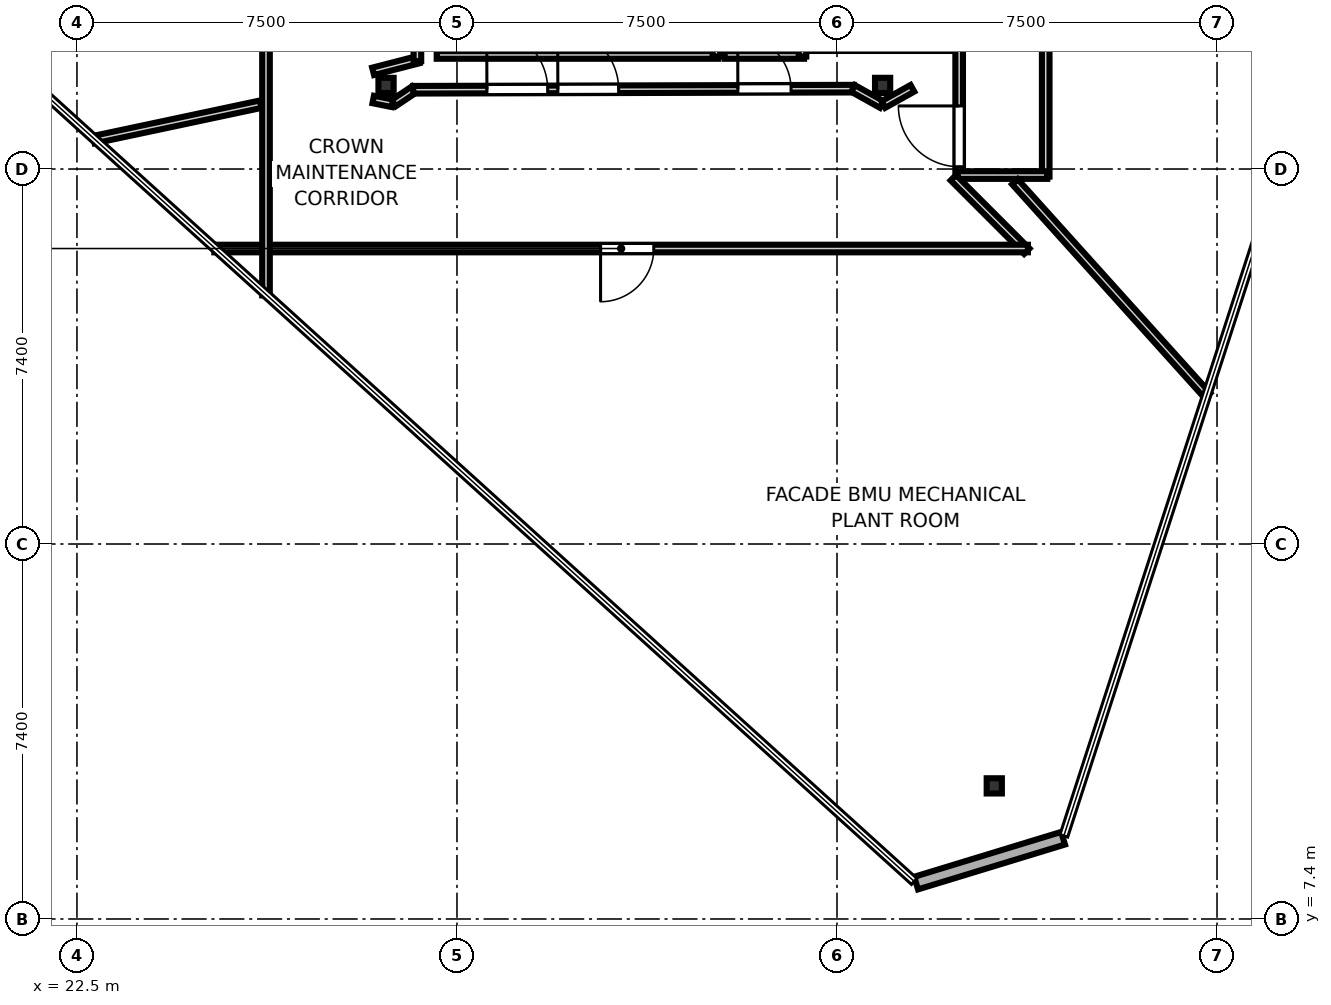
"""IFC4 building model, lengths in metres.
Left out: names, types, materials, properties, quantities, classifications, styles, units other than length and angle.
Written with IfcOpenShell. Run it as: python <this file> out.ifc"""

import sys

from ifc_helpers import new_model, si_unit, direction, frame, frame_2d, origin, origin_2d, place, context, subcontext, project, spatial, rectangle, i_section, extrude, element, fill, save


model = new_model("IFC4")
c1 = context("Model", 3, precision=1e-05, world=origin(), true_north=direction((0.0, 1.0)))
c2 = subcontext(c1, "Body", "Model", "MODEL_VIEW")
j1 = project(units=[si_unit("LENGTHUNIT", "METRE"), si_unit("PLANEANGLEUNIT", "RADIAN")], contexts=[c1])
p1 = place(None, origin())
s1 = spatial("IfcSite", under=j1, at=p1, CompositionType="ELEMENT")
p2 = place(p1, origin())
s2 = spatial("IfcBuilding", under=s1, at=p2, CompositionType="ELEMENT")
p3 = place(p2, frame((0.0, 0.0, 367.55)))
s3 = spatial("IfcBuildingStorey", under=s2, at=p3, CompositionType="ELEMENT", Elevation=367.55)
for number, where, z_axis, x_axis in (
    (1, (28.6, 23.85, 0.0), (0.0, 0.0, 1.0), (1.0, 0.0, 0.0)),
    (2, (38.4, 23.85, 0.0), (0.0, 0.0, 1.0), (1.0, 0.0, 0.0)),
    (3, (40.604, 10.027, 0.0), (0.0, 0.0, 1.0), (1.0, 0.0, 0.0)),
):
    element("IfcColumn", number, at=place(p3, frame(where, z_axis=z_axis, x_axis=x_axis)), inside=s3, PredefinedType="COLUMN", context=c2, shape_type="SweptSolid", body=[
        extrude(i_section(OverallWidth=0.3, OverallDepth=0.3, WebThickness=0.01, FlangeThickness=0.015, at=origin_2d()), origin(), (0.0, 0.0, 1.0), 3.75),
    ])
p4 = place(p3, frame((39.061, 8.108, 0.0), z_axis=(0.0, 0.0, 1.0), x_axis=(0.956448382661, 0.291901509598, 0.0)))
e4 = element("IfcWall", 4, at=p4, inside=s3, PredefinedType="SOLIDWALL", context=c2, shape_type="SweptSolid", body=[
    extrude(rectangle(XDim=3.033, YDim=0.26, at=frame_2d((1.516, 0.0))), origin(), (0.0, 0.0, 1.0), 3.55),
])
p5 = place(p3, frame((35.15, 24.451, 0.0), z_axis=(0.0, 0.0, 1.0), x_axis=(-1.0, 0.0, 0.0)))
e5 = element("IfcWall", 5, at=p5, inside=s3, PredefinedType="PARTITIONING", context=c2, shape_type="SweptSolid", body=[
    extrude(rectangle(XDim=5.55, YDim=0.15, at=frame_2d((2.775, 0.0))), origin(), (0.0, 0.0, 1.0), 2.87),
])
p6 = place(p3, frame((35.119, 29.38, 0.0), z_axis=(0.0, 0.0, 1.0), x_axis=(0.0, -1.0, 0.0)))
e6 = element("IfcWall", 6, at=p6, inside=s3, PredefinedType="PARTITIONING", context=c2, shape_type="SweptSolid", body=[
    extrude(rectangle(XDim=4.96, YDim=0.15, at=frame_2d((2.48, 0.0))), origin(), (0.0, 0.0, 1.0), 2.08),
])
p7 = place(p3, frame((39.911, 22.05, 0.0), z_axis=(0.0, 0.0, 1.0), x_axis=(0.0, 1.0, 0.0)))
e7 = element("IfcWall", 7, at=p7, inside=s3, PredefinedType="PARTITIONING", context=c2, shape_type="SweptSolid", body=[
    extrude(rectangle(XDim=2.71, YDim=0.15, at=frame_2d((1.355, 0.0))), origin(), (0.0, 0.0, 1.0), 2.87),
])
p8 = place(p7, frame((0.195, 0.0, 0.0)))
e8 = element("IfcOpeningElement", 8, at=p8, cuts=e7, PredefinedType="OPENING", context=c2, shape_type="SweptSolid", body=[
    extrude(rectangle(XDim=1.2, YDim=2.15, at=frame_2d((0.6, 1.075))), frame((0.0, 0.085, 0.0), z_axis=(0.0, -1.0, 0.0), x_axis=(1.0, 0.0, 0.0)), (0.0, 0.0, 1.0), 0.17),
])
p9 = place(p3, frame((41.619, 34.8, 0.0), z_axis=(0.0, 0.0, 1.0), x_axis=(0.0, -1.0, 0.0)))
e9 = element("IfcWall", 9, at=p9, inside=s3, PredefinedType="PARTITIONING", context=c2, shape_type="SweptSolid", body=[
    extrude(rectangle(XDim=12.75, YDim=0.15, at=frame_2d((6.375, 0.0))), origin(), (0.0, 0.0, 1.0), 2.87),
])
p10 = place(p9, frame((5.85, 0.0, 0.0)))
e10 = element("IfcOpeningElement", 10, at=p10, cuts=e9, PredefinedType="OPENING", context=c2, shape_type="SweptSolid", body=[
    extrude(rectangle(XDim=1.05, YDim=2.15, at=frame_2d((0.525, 1.075))), frame((0.0, 0.085, 0.0), z_axis=(0.0, -1.0, 0.0), x_axis=(1.0, 0.0, 0.0)), (0.0, 0.0, 1.0), 0.17),
])
p11 = place(p3, frame((41.65, 22.081, 0.0), z_axis=(0.0, 0.0, 1.0), x_axis=(-1.0, 0.0, 0.0)))
e11 = element("IfcWall", 11, at=p11, inside=s3, PredefinedType="PARTITIONING", context=c2, shape_type="SweptSolid", body=[
    extrude(rectangle(XDim=1.77, YDim=0.15, at=frame_2d((0.885, 0.0))), origin(), (0.0, 0.0, 1.0), 2.87),
])
p12 = place(p3, frame((36.85, 24.451, 0.0), z_axis=(0.0, 0.0, 1.0), x_axis=(-1.0, 0.0, 0.0)))
e12 = element("IfcWall", 12, at=p12, inside=s3, PredefinedType="PARTITIONING", context=c2, shape_type="SweptSolid", body=[
    extrude(rectangle(XDim=1.57, YDim=0.15, at=frame_2d((0.785, 0.0))), origin(), (0.0, 0.0, 1.0), 2.87),
])
p13 = place(p3, frame((36.819, 27.1, 0.0), z_axis=(0.0, 0.0, 1.0), x_axis=(0.0, -1.0, 0.0)))
e13 = element("IfcWall", 13, at=p13, inside=s3, PredefinedType="PARTITIONING", context=c2, shape_type="SweptSolid", body=[
    extrude(rectangle(XDim=2.68, YDim=0.15, at=frame_2d((1.34, 0.0))), origin(), (0.0, 0.0, 1.0), 2.87),
])
p14 = place(p3, frame((29.242, 24.359, 0.0), z_axis=(0.0, 0.0, 1.0), x_axis=(-0.968190928123, -0.250212563035, 0.0)))
e14 = element("IfcWall", 14, at=p14, inside=s3, PredefinedType="PARTITIONING", context=c2, shape_type="SweptSolid", body=[
    extrude(rectangle(XDim=0.927, YDim=0.15, at=frame_2d((0.463, 0.0))), origin(), (0.0, 0.0, 1.0), 2.87),
])
p15 = place(p3, frame((28.346, 23.572, 0.0), z_axis=(0.0, 0.0, 1.0), x_axis=(0.980749356168, -0.19527083852, 0.0)))
e15 = element("IfcWall", 15, at=p15, inside=s3, PredefinedType="PARTITIONING", context=c2, shape_type="SweptSolid", body=[
    extrude(rectangle(XDim=0.389, YDim=0.15, at=frame_2d((0.194, 0.0))), origin(), (0.0, 0.0, 1.0), 2.87),
])
p16 = place(p3, frame((28.751, 23.501, 0.0), z_axis=(0.0, 0.0, 1.0), x_axis=(0.831506528289, 0.555514980368, 0.0)))
e16 = element("IfcWall", 16, at=p16, inside=s3, PredefinedType="PARTITIONING", context=c2, shape_type="SweptSolid", body=[
    extrude(rectangle(XDim=0.484, YDim=0.15, at=frame_2d((0.242, 0.0))), origin(), (0.0, 0.0, 1.0), 2.87),
])
p17 = place(p3, frame((29.136, 23.764, 0.0), z_axis=(0.0, 0.0, 1.0), x_axis=(0.999996877471, 0.002499009437, 0.0)))
e17 = element("IfcWall", 17, at=p17, inside=s3, PredefinedType="PARTITIONING", context=c2, shape_type="SweptSolid", body=[
    extrude(rectangle(XDim=8.695, YDim=0.15, at=frame_2d((4.347, 0.0))), origin(), (0.0, 0.0, 1.0), 2.87),
])
p18 = place(p17, frame((2.854, 0.0, 0.0)))
e18 = element("IfcOpeningElement", 18, at=p18, cuts=e17, PredefinedType="OPENING", context=c2, shape_type="SweptSolid", body=[
    extrude(rectangle(XDim=1.2, YDim=2.15, at=frame_2d((0.6, 1.075))), frame((0.0, 0.085, 0.0), z_axis=(0.0, -1.0, 0.0), x_axis=(1.0, 0.0, 0.0)), (0.0, 0.0, 1.0), 0.17),
])
p19 = place(p17, frame((6.407, 0.0, 0.0)))
e19 = element("IfcOpeningElement", 19, at=p19, cuts=e17, PredefinedType="OPENING", context=c2, shape_type="SweptSolid", body=[
    extrude(rectangle(XDim=1.05, YDim=2.15, at=frame_2d((0.525, 1.075))), frame((0.0, 0.085, 0.0), z_axis=(0.0, -1.0, 0.0), x_axis=(1.0, 0.0, 0.0)), (0.0, 0.0, 1.0), 0.17),
])
p20 = place(p17, frame((1.454, 0.0, 0.0)))
e20 = element("IfcOpeningElement", 20, at=p20, cuts=e17, PredefinedType="OPENING", context=c2, shape_type="SweptSolid", body=[
    extrude(rectangle(XDim=1.2, YDim=2.15, at=frame_2d((0.6, 1.075))), frame((0.0, 0.085, 0.0), z_axis=(0.0, -1.0, 0.0), x_axis=(1.0, 0.0, 0.0)), (0.0, 0.0, 1.0), 0.17),
])
p21 = place(p3, frame((37.816, 23.79, 0.0), z_axis=(0.0, 0.0, 1.0), x_axis=(0.873431330758, -0.486947338478, 0.0)))
e21 = element("IfcWall", 21, at=p21, inside=s3, PredefinedType="PARTITIONING", context=c2, shape_type="SweptSolid", body=[
    extrude(rectangle(XDim=0.651, YDim=0.15, at=frame_2d((0.326, 0.0))), origin(), (0.0, 0.0, 1.0), 2.87),
])
p22 = place(p3, frame((38.415, 23.473, 0.0), z_axis=(0.0, 0.0, 1.0), x_axis=(0.873120406102, 0.487504621976, 0.0)))
e22 = element("IfcWall", 22, at=p22, inside=s3, PredefinedType="PARTITIONING", context=c2, shape_type="SweptSolid", body=[
    extrude(rectangle(XDim=0.656, YDim=0.15, at=frame_2d((0.328, 0.0))), origin(), (0.0, 0.0, 1.0), 2.87),
])
p23 = place(p3, frame((39.796, 22.028, 0.0), z_axis=(0.0, 0.0, 1.0), x_axis=(0.707106781187, -0.707106781187, 0.0)))
e23 = element("IfcWall", 23, at=p23, inside=s3, PredefinedType="PARTITIONING", context=c2, shape_type="SweptSolid", body=[
    extrude(rectangle(XDim=2.051, YDim=0.15, at=frame_2d((1.025, 0.0))), origin(), (0.0, 0.0, 1.0), 2.87),
])
p24 = place(p3, frame((41.268, 20.631, 0.0), z_axis=(0.0, 0.0, 1.0), x_axis=(-1.0, 0.0, 0.0)))
e24 = element("IfcWall", 24, at=p24, inside=s3, PredefinedType="PARTITIONING", context=c2, shape_type="SweptSolid", body=[
    extrude(rectangle(XDim=16.057, YDim=0.15, at=frame_2d((8.028, 0.0))), origin(), (0.0, 0.0, 1.0), 2.87),
])
p25 = place(p24, frame((7.384, 0.0, 0.0)))
e25 = element("IfcOpeningElement", 25, at=p25, cuts=e24, PredefinedType="OPENING", context=c2, shape_type="SweptSolid", body=[
    extrude(rectangle(XDim=1.05, YDim=2.15, at=frame_2d((0.525, 1.075))), frame((0.0, 0.085, 0.0), z_axis=(0.0, -1.0, 0.0), x_axis=(1.0, 0.0, 0.0)), (0.0, 0.0, 1.0), 0.17),
])
p26 = place(p3, frame((26.231, 19.706, 0.0), z_axis=(0.0, 0.0, 1.0), x_axis=(0.0, 1.0, 0.0)))
e26 = element("IfcWall", 26, at=p26, inside=s3, PredefinedType="PARTITIONING", context=c2, shape_type="SweptSolid", body=[
    extrude(rectangle(XDim=11.742, YDim=0.15, at=frame_2d((5.871, 0.0))), origin(), (0.0, 0.0, 1.0), 2.87),
])
p27 = place(p26, frame((6.948, 0.0, 0.0)))
e27 = element("IfcOpeningElement", 27, at=p27, cuts=e26, PredefinedType="OPENING", context=c2, shape_type="SweptSolid", body=[
    extrude(rectangle(XDim=1.05, YDim=2.15, at=frame_2d((0.525, 1.075))), frame((0.0, 0.085, 0.0), z_axis=(0.0, -1.0, 0.0), x_axis=(1.0, 0.0, 0.0)), (0.0, 0.0, 1.0), 0.17),
])
p28 = place(p3, frame((29.219, 32.757, 0.0), z_axis=(0.0, 0.0, 1.0), x_axis=(0.0, -1.0, 0.0)))
e28 = element("IfcWall", 28, at=p28, inside=s3, PredefinedType="PARTITIONING", context=c2, shape_type="SweptSolid", body=[
    extrude(rectangle(XDim=8.428, YDim=0.15, at=frame_2d((4.214, 0.0))), origin(), (0.0, 0.0, 1.0), 2.87),
])
p29 = place(p3, frame((22.834, 22.78, 0.0), z_axis=(0.0, 0.0, 1.0), x_axis=(0.978152398194, 0.20788911926, 0.0)))
e29 = element("IfcWall", 29, at=p29, inside=s3, PredefinedType="PARTITIONING", context=c2, shape_type="SweptSolid", body=[
    extrude(rectangle(XDim=3.366, YDim=0.15, at=frame_2d((1.683, 0.0))), origin(), (0.0, 0.0, 1.0), 2.87),
])
p30 = place(p3, frame((41.011, 21.949, 0.0), z_axis=(0.0, 0.0, 1.0), x_axis=(0.669147587513, -0.743129535226, 0.0)))
e30 = element("IfcWall", 30, at=p30, inside=s3, PredefinedType="PARTITIONING", context=c2, shape_type="SweptSolid", body=[
    extrude(rectangle(XDim=5.679, YDim=0.15, at=frame_2d((2.84, 0.0))), origin(), (0.0, 0.0, 1.0), 2.87),
])
p31 = place(p18, origin())
e31 = element("IfcDoor", 31, at=p31, inside=s3, OperationType="SINGLE_SWING_LEFT", PredefinedType="DOOR", context=c2, shape_type="SweptSolid", body=[
    extrude(rectangle(XDim=1.2, YDim=2.15, at=frame_2d((0.6, 1.075))), frame((0.0, 0.025, 0.0), z_axis=(0.0, -1.0, 0.0), x_axis=(1.0, 0.0, 0.0)), (0.0, 0.0, 1.0), 0.05),
])
fill(e18, e31)
p32 = place(p8, origin())
e32 = element("IfcDoor", 32, at=p32, inside=s3, OperationType="SINGLE_SWING_RIGHT", PredefinedType="DOOR", context=c2, shape_type="SweptSolid", body=[
    extrude(rectangle(XDim=1.2, YDim=2.15, at=frame_2d((0.6, 1.075))), frame((0.0, 0.025, 0.0), z_axis=(0.0, -1.0, 0.0), x_axis=(1.0, 0.0, 0.0)), (0.0, 0.0, 1.0), 0.05),
])
fill(e8, e32)
p33 = place(p19, origin())
e33 = element("IfcDoor", 33, at=p33, inside=s3, OperationType="SINGLE_SWING_LEFT", PredefinedType="DOOR", context=c2, shape_type="SweptSolid", body=[
    extrude(rectangle(XDim=1.05, YDim=2.15, at=frame_2d((0.525, 1.075))), frame((0.0, 0.025, 0.0), z_axis=(0.0, -1.0, 0.0), x_axis=(1.0, 0.0, 0.0)), (0.0, 0.0, 1.0), 0.05),
])
fill(e19, e33)
p34 = place(p20, origin())
e34 = element("IfcDoor", 34, at=p34, inside=s3, OperationType="SINGLE_SWING_LEFT", PredefinedType="DOOR", context=c2, shape_type="SweptSolid", body=[
    extrude(rectangle(XDim=1.2, YDim=2.15, at=frame_2d((0.6, 1.075))), frame((0.0, 0.025, 0.0), z_axis=(0.0, -1.0, 0.0), x_axis=(1.0, 0.0, 0.0)), (0.0, 0.0, 1.0), 0.05),
])
fill(e20, e34)
p35 = place(p25, origin())
e35 = element("IfcDoor", 35, at=p35, inside=s3, OperationType="SINGLE_SWING_RIGHT", PredefinedType="DOOR", context=c2, shape_type="SweptSolid", body=[
    extrude(rectangle(XDim=1.05, YDim=2.15, at=frame_2d((0.525, 1.075))), frame((0.0, 0.025, 0.0), z_axis=(0.0, -1.0, 0.0), x_axis=(1.0, 0.0, 0.0)), (0.0, 0.0, 1.0), 0.05),
])
fill(e25, e35)
save(model, sys.argv[1])
